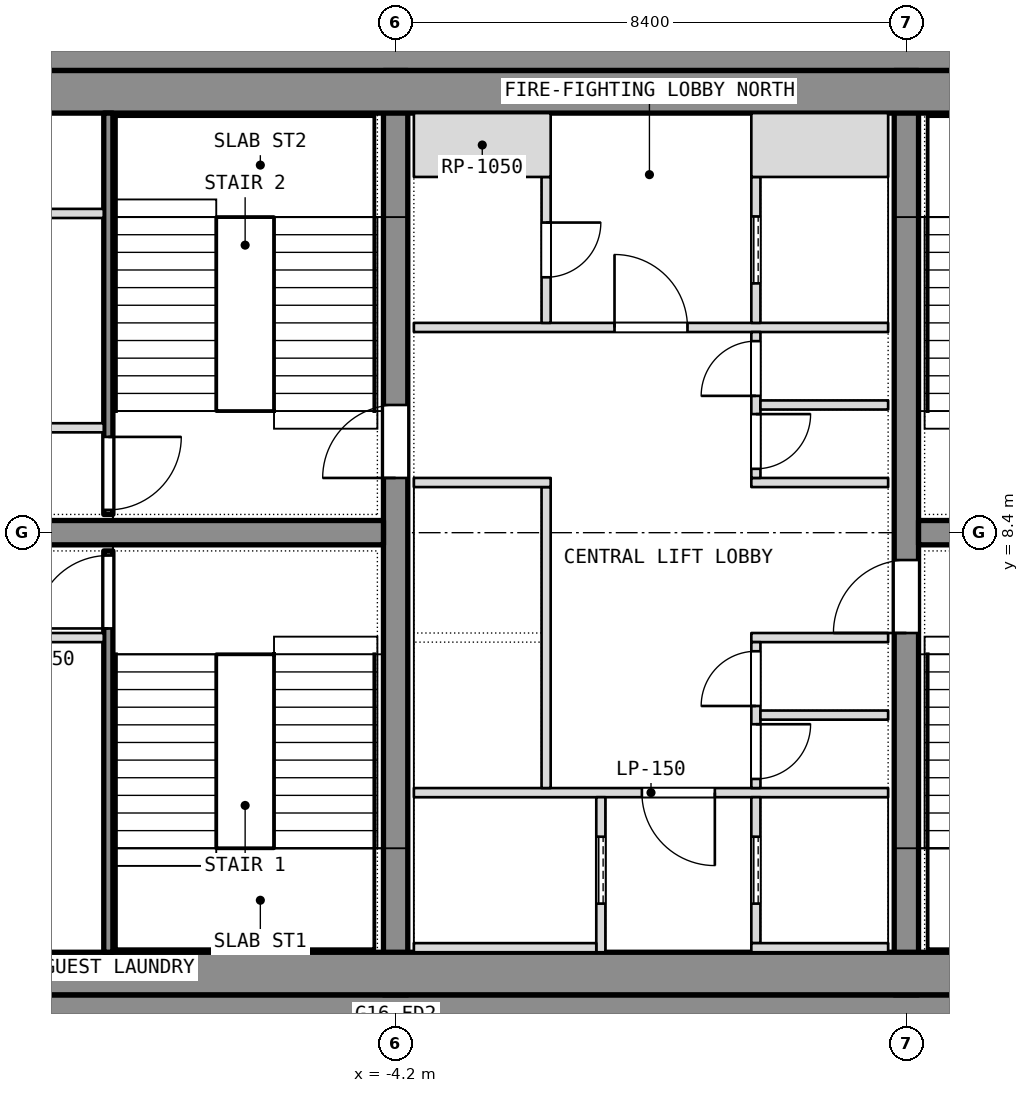
"""IFC4 building model, lengths in metres.
Left out: names, types, materials, properties, quantities, classifications, styles, units other than length and angle.
Written with IfcOpenShell. Run it as: python <this file> out.ifc"""

import sys

from ifc_helpers import new_model, si_unit, direction, frame, frame_2d, origin, place, context, subcontext, project, spatial, rectangle, extrude, element, fill, save


model = new_model("IFC4")
c1 = context("Model", 3, precision=1e-05, world=origin(), true_north=direction((0.0, 1.0)))
c2 = subcontext(c1, "Body", "Model", "MODEL_VIEW")
j1 = project(units=[si_unit("LENGTHUNIT", "METRE"), si_unit("PLANEANGLEUNIT", "RADIAN")], contexts=[c1])
p1 = place(None, origin())
s1 = spatial("IfcSite", under=j1, at=p1, CompositionType="ELEMENT")
p2 = place(p1, origin())
s2 = spatial("IfcBuilding", under=s1, at=p2, CompositionType="ELEMENT")
p3 = place(p2, frame((0.0, 0.0, 202.1)))
s3 = spatial("IfcBuildingStorey", under=s2, at=p3, CompositionType="ELEMENT", Elevation=202.1)
for number, where, z_axis, x_axis in (
    (1, (-11.1, 0.4, 0.0), (0.0, 0.0, 1.0), (1.0, 0.0, 0.0)),
    (2, (-11.1, 16.4, 0.0), (0.0, 0.0, 1.0), (1.0, 0.0, 0.0)),
):
    element("IfcWall", number, at=place(p3, frame(where, z_axis=z_axis, x_axis=x_axis)), inside=s3, PredefinedType="SHEAR", context=c2, shape_type="SweptSolid", body=[
        extrude(rectangle(XDim=22.2, YDim=0.8, at=frame_2d((11.1, 0.0))), origin(), (0.0, 0.0, 1.0), 3.6),
    ])
p4 = place(p3, frame((-4.2, 0.8, 0.0), z_axis=(0.0, 0.0, 1.0), x_axis=(0.0, 1.0, 0.0)))
e3 = element("IfcWall", 3, at=p4, inside=s3, PredefinedType="SHEAR", context=c2, shape_type="SweptSolid", body=[
    extrude(rectangle(XDim=15.2, YDim=0.4, at=frame_2d((7.6, 0.0))), origin(), (0.0, 0.0, 1.0), 3.6),
])
p5 = place(p4, frame((8.5, 0.0, 0.0)))
e4 = element("IfcOpeningElement", 4, at=p5, cuts=e3, PredefinedType="OPENING", context=c2, shape_type="SweptSolid", body=[
    extrude(rectangle(XDim=1.2, YDim=2.1, at=frame_2d((0.6, 1.05))), frame((0.0, 0.2, 0.0), z_axis=(0.0, -1.0, 0.0), x_axis=(1.0, 0.0, 0.0)), (0.0, 0.0, 1.0), 0.4),
])
p6 = place(p3, frame((4.2, 0.8, 0.0), z_axis=(0.0, 0.0, 1.0), x_axis=(0.0, 1.0, 0.0)))
e5 = element("IfcWall", 5, at=p6, inside=s3, PredefinedType="SHEAR", context=c2, shape_type="SweptSolid", body=[
    extrude(rectangle(XDim=15.2, YDim=0.4, at=frame_2d((7.6, 0.0))), origin(), (0.0, 0.0, 1.0), 3.6),
])
p7 = place(p6, frame((5.95, 0.0, 0.0)))
e6 = element("IfcOpeningElement", 6, at=p7, cuts=e5, PredefinedType="OPENING", context=c2, shape_type="SweptSolid", body=[
    extrude(rectangle(XDim=1.2, YDim=2.1, at=frame_2d((0.6, 1.05))), frame((0.0, 0.2, 0.0), z_axis=(0.0, -1.0, 0.0), x_axis=(1.0, 0.0, 0.0)), (0.0, 0.0, 1.0), 0.4),
])
for number, where, z_axis, x_axis in (
    (7, (-11.1, 8.4, 0.0), (0.0, 0.0, 1.0), (1.0, 0.0, 0.0)),
    (8, (4.4, 8.4, 0.0), (0.0, 0.0, 1.0), (1.0, 0.0, 0.0)),
):
    element("IfcWall", number, at=place(p3, frame(where, z_axis=z_axis, x_axis=x_axis)), inside=s3, PredefinedType="SHEAR", context=c2, shape_type="SweptSolid", body=[
        extrude(rectangle(XDim=6.7, YDim=0.4, at=frame_2d((3.35, 0.0))), origin(), (0.0, 0.0, 1.0), 3.6),
    ])
for number, where, z_axis, x_axis in (
    (9, (-11.1, 1.15, 0.0), (0.0, 0.0, 1.0), (1.0, 0.0, 0.0)),
    (10, (-11.1, 15.65, 0.0), (0.0, 0.0, 1.0), (1.0, 0.0, 0.0)),
):
    element("IfcWall", number, at=place(p3, frame(where, z_axis=z_axis, x_axis=x_axis)), inside=s3, PredefinedType="PARTITIONING", context=c2, shape_type="SweptSolid", body=[
        extrude(rectangle(XDim=22.2, YDim=0.7, at=frame_2d((11.1, 0.0))), origin(), (0.0, 0.0, 1.0), 3.34),
    ])
p8 = place(p3, frame((-8.925, 1.5, 0.0), z_axis=(0.0, 0.0, 1.0), x_axis=(0.0, 1.0, 0.0)))
e11 = element("IfcWall", 11, at=p8, inside=s3, PredefinedType="SHEAR", context=c2, shape_type="SweptSolid", body=[
    extrude(rectangle(XDim=6.6, YDim=0.15, at=frame_2d((3.3, 0.0))), origin(), (0.0, 0.0, 1.0), 3.34),
])
p9 = place(p8, frame((5.325, 0.0, 0.0)))
e12 = element("IfcOpeningElement", 12, at=p9, cuts=e11, PredefinedType="OPENING", context=c2, shape_type="SweptSolid", body=[
    extrude(rectangle(XDim=1.2, YDim=2.1, at=frame_2d((0.6, 1.05))), frame((0.0, 0.075, 0.0), z_axis=(0.0, -1.0, 0.0), x_axis=(1.0, 0.0, 0.0)), (0.0, 0.0, 1.0), 0.15),
])
p10 = place(p3, frame((-11.1, 6.675, 0.0), z_axis=(0.0, 0.0, 1.0), x_axis=(1.0, 0.0, 0.0)))
e13 = element("IfcWall", 13, at=p10, inside=s3, PredefinedType="PARTITIONING", context=c2, shape_type="SweptSolid", body=[
    extrude(rectangle(XDim=2.1, YDim=0.15, at=frame_2d((1.05, 0.0))), origin(), (0.0, 0.0, 1.0), 3.34),
])
p11 = place(p3, frame((-8.925, 8.7, 0.0), z_axis=(0.0, 0.0, 1.0), x_axis=(0.0, 1.0, 0.0)))
e14 = element("IfcWall", 14, at=p11, inside=s3, PredefinedType="SHEAR", context=c2, shape_type="SweptSolid", body=[
    extrude(rectangle(XDim=6.6, YDim=0.15, at=frame_2d((3.3, 0.0))), origin(), (0.0, 0.0, 1.0), 3.34),
])
p12 = place(p11, frame((0.075, 0.0, 0.0)))
e15 = element("IfcOpeningElement", 15, at=p12, cuts=e14, PredefinedType="OPENING", context=c2, shape_type="SweptSolid", body=[
    extrude(rectangle(XDim=1.2, YDim=2.1, at=frame_2d((0.6, 1.05))), frame((0.0, 0.075, 0.0), z_axis=(0.0, -1.0, 0.0), x_axis=(1.0, 0.0, 0.0)), (0.0, 0.0, 1.0), 0.15),
])
for number, where, z_axis, x_axis in (
    (16, (-11.1, 10.125, 0.0), (0.0, 0.0, 1.0), (1.0, 0.0, 0.0)),
    (17, (-11.1, 13.65, 0.0), (0.0, 0.0, 1.0), (1.0, 0.0, 0.0)),
):
    element("IfcWall", number, at=place(p3, frame(where, z_axis=z_axis, x_axis=x_axis)), inside=s3, PredefinedType="PARTITIONING", context=c2, shape_type="SweptSolid", body=[
        extrude(rectangle(XDim=2.1, YDim=0.15, at=frame_2d((1.05, 0.0))), origin(), (0.0, 0.0, 1.0), 3.34),
    ])
p13 = place(p3, frame((-3.9, 4.125, 0.0), z_axis=(0.0, 0.0, 1.0), x_axis=(1.0, 0.0, 0.0)))
e18 = element("IfcWall", 18, at=p13, inside=s3, PredefinedType="PARTITIONING", context=c2, shape_type="SweptSolid", body=[
    extrude(rectangle(XDim=7.8, YDim=0.15, at=frame_2d((3.9, 0.0))), origin(), (0.0, 0.0, 1.0), 3.34),
])
p14 = place(p13, frame((3.75, 0.0, 0.0)))
e19 = element("IfcOpeningElement", 19, at=p14, cuts=e18, PredefinedType="OPENING", context=c2, shape_type="SweptSolid", body=[
    extrude(rectangle(XDim=1.2, YDim=2.1, at=frame_2d((0.6, 1.05))), frame((0.0, 0.075, 0.0), z_axis=(0.0, -1.0, 0.0), x_axis=(1.0, 0.0, 0.0)), (0.0, 0.0, 1.0), 0.15),
])
p15 = place(p3, frame((-3.9, 11.775, 0.0), z_axis=(0.0, 0.0, 1.0), x_axis=(1.0, 0.0, 0.0)))
e20 = element("IfcWall", 20, at=p15, inside=s3, PredefinedType="PARTITIONING", context=c2, shape_type="SweptSolid", body=[
    extrude(rectangle(XDim=7.8, YDim=0.15, at=frame_2d((3.9, 0.0))), origin(), (0.0, 0.0, 1.0), 3.34),
])
p16 = place(p15, frame((3.3, 0.0, 0.0)))
e21 = element("IfcOpeningElement", 21, at=p16, cuts=e20, PredefinedType="OPENING", context=c2, shape_type="SweptSolid", body=[
    extrude(rectangle(XDim=1.2, YDim=2.1, at=frame_2d((0.6, 1.05))), frame((0.0, 0.075, 0.0), z_axis=(0.0, -1.0, 0.0), x_axis=(1.0, 0.0, 0.0)), (0.0, 0.0, 1.0), 0.15),
])
p17 = place(p3, frame((-0.825, 1.5, 0.0), z_axis=(0.0, 0.0, 1.0), x_axis=(0.0, 1.0, 0.0)))
e22 = element("IfcWall", 22, at=p17, inside=s3, PredefinedType="SHEAR", context=c2, shape_type="SweptSolid", body=[
    extrude(rectangle(XDim=2.55, YDim=0.15, at=frame_2d((1.275, 0.0))), origin(), (0.0, 0.0, 1.0), 3.6),
])
p18 = place(p17, frame((0.8, 0.0, 0.0)))
e23 = element("IfcOpeningElement", 23, at=p18, cuts=e22, PredefinedType="OPENING", context=c2, shape_type="SweptSolid", body=[
    extrude(rectangle(XDim=1.1, YDim=2.1, at=frame_2d((0.55, 1.05))), frame((0.0, 0.075, 0.0), z_axis=(0.0, -1.0, 0.0), x_axis=(1.0, 0.0, 0.0)), (0.0, 0.0, 1.0), 0.15),
])
p19 = place(p3, frame((-3.9, 1.575, 0.0), z_axis=(0.0, 0.0, 1.0), x_axis=(1.0, 0.0, 0.0)))
e24 = element("IfcWall", 24, at=p19, inside=s3, PredefinedType="SHEAR", context=c2, shape_type="SweptSolid", body=[
    extrude(rectangle(XDim=3.0, YDim=0.15, at=frame_2d((1.5, 0.0))), origin(), (0.0, 0.0, 1.0), 3.6),
])
p20 = place(p3, frame((-1.725, 4.2, 0.0), z_axis=(0.0, 0.0, 1.0), x_axis=(0.0, 1.0, 0.0)))
e25 = element("IfcWall", 25, at=p20, inside=s3, PredefinedType="SHEAR", context=c2, shape_type="SweptSolid", body=[
    extrude(rectangle(XDim=4.95, YDim=0.15, at=frame_2d((2.475, 0.0))), origin(), (0.0, 0.0, 1.0), 3.6),
])
p21 = place(p3, frame((-3.9, 9.225, 0.0), z_axis=(0.0, 0.0, 1.0), x_axis=(1.0, 0.0, 0.0)))
e26 = element("IfcWall", 26, at=p21, inside=s3, PredefinedType="SHEAR", context=c2, shape_type="SweptSolid", body=[
    extrude(rectangle(XDim=2.25, YDim=0.15, at=frame_2d((1.125, 0.0))), origin(), (0.0, 0.0, 1.0), 3.6),
])
p22 = place(p3, frame((-1.725, 11.85, 0.0), z_axis=(0.0, 0.0, 1.0), x_axis=(0.0, 1.0, 0.0)))
e27 = element("IfcWall", 27, at=p22, inside=s3, PredefinedType="PARTITIONING", context=c2, shape_type="SweptSolid", body=[
    extrude(rectangle(XDim=2.4, YDim=0.15, at=frame_2d((1.2, 0.0))), origin(), (0.0, 0.0, 1.0), 3.34),
])
p23 = place(p22, frame((0.75, 0.0, 0.0)))
e28 = element("IfcOpeningElement", 28, at=p23, cuts=e27, PredefinedType="OPENING", context=c2, shape_type="SweptSolid", body=[
    extrude(rectangle(XDim=0.9, YDim=2.1, at=frame_2d((0.45, 1.05))), frame((0.0, 0.075, 0.0), z_axis=(0.0, -1.0, 0.0), x_axis=(1.0, 0.0, 0.0)), (0.0, 0.0, 1.0), 0.15),
])
p24 = place(p3, frame((-3.9, 14.775, 0.0), z_axis=(0.0, 0.0, 1.0), x_axis=(1.0, 0.0, 0.0)))
e29 = element("IfcWall", 29, at=p24, inside=s3, PredefinedType="PARTITIONING", context=c2, shape_type="SweptSolid", body=[
    extrude(rectangle(XDim=2.25, YDim=1.05, at=frame_2d((1.125, 0.0))), origin(), (0.0, 0.0, 1.0), 3.34),
])
p25 = place(p3, frame((1.725, 1.65, 0.0), z_axis=(0.0, 0.0, 1.0), x_axis=(0.0, 1.0, 0.0)))
e30 = element("IfcWall", 30, at=p25, inside=s3, PredefinedType="SHEAR", context=c2, shape_type="SweptSolid", body=[
    extrude(rectangle(XDim=2.4, YDim=0.15, at=frame_2d((1.2, 0.0))), origin(), (0.0, 0.0, 1.0), 3.6),
])
p26 = place(p25, frame((0.65, 0.0, 0.0)))
e31 = element("IfcOpeningElement", 31, at=p26, cuts=e30, PredefinedType="OPENING", context=c2, shape_type="SweptSolid", body=[
    extrude(rectangle(XDim=1.1, YDim=2.1, at=frame_2d((0.55, 1.05))), frame((0.0, 0.075, 0.0), z_axis=(0.0, -1.0, 0.0), x_axis=(1.0, 0.0, 0.0)), (0.0, 0.0, 1.0), 0.15),
])
p27 = place(p3, frame((1.65, 1.575, 0.0), z_axis=(0.0, 0.0, 1.0), x_axis=(1.0, 0.0, 0.0)))
e32 = element("IfcWall", 32, at=p27, inside=s3, PredefinedType="SHEAR", context=c2, shape_type="SweptSolid", body=[
    extrude(rectangle(XDim=2.25, YDim=0.15, at=frame_2d((1.125, 0.0))), origin(), (0.0, 0.0, 1.0), 3.6),
])
p28 = place(p3, frame((1.725, 11.85, 0.0), z_axis=(0.0, 0.0, 1.0), x_axis=(0.0, 1.0, 0.0)))
e33 = element("IfcWall", 33, at=p28, inside=s3, PredefinedType="SHEAR", context=c2, shape_type="SweptSolid", body=[
    extrude(rectangle(XDim=2.4, YDim=0.15, at=frame_2d((1.2, 0.0))), origin(), (0.0, 0.0, 1.0), 3.6),
])
p29 = place(p28, frame((0.65, 0.0, 0.0)))
e34 = element("IfcOpeningElement", 34, at=p29, cuts=e33, PredefinedType="OPENING", context=c2, shape_type="SweptSolid", body=[
    extrude(rectangle(XDim=1.1, YDim=2.1, at=frame_2d((0.55, 1.05))), frame((0.0, 0.075, 0.0), z_axis=(0.0, -1.0, 0.0), x_axis=(1.0, 0.0, 0.0)), (0.0, 0.0, 1.0), 0.15),
])
p30 = place(p3, frame((1.65, 14.775, 0.0), z_axis=(0.0, 0.0, 1.0), x_axis=(1.0, 0.0, 0.0)))
e35 = element("IfcWall", 35, at=p30, inside=s3, PredefinedType="SHEAR", context=c2, shape_type="SweptSolid", body=[
    extrude(rectangle(XDim=2.25, YDim=1.05, at=frame_2d((1.125, 0.0))), origin(), (0.0, 0.0, 1.0), 3.6),
])
for number, where, z_axis, x_axis in (
    (36, (1.65, 6.675, 0.0), (0.0, 0.0, 1.0), (1.0, 0.0, 0.0)),
    (37, (1.65, 9.225, 0.0), (0.0, 0.0, 1.0), (1.0, 0.0, 0.0)),
):
    element("IfcWall", number, at=place(p3, frame(where, z_axis=z_axis, x_axis=x_axis)), inside=s3, PredefinedType="PARTITIONING", context=c2, shape_type="SweptSolid", body=[
        extrude(rectangle(XDim=2.25, YDim=0.15, at=frame_2d((1.125, 0.0))), origin(), (0.0, 0.0, 1.0), 3.34),
    ])
p31 = place(p3, frame((1.725, 4.2, 0.0), z_axis=(0.0, 0.0, 1.0), x_axis=(0.0, 1.0, 0.0)))
e38 = element("IfcWall", 38, at=p31, inside=s3, PredefinedType="PARTITIONING", context=c2, shape_type="SweptSolid", body=[
    extrude(rectangle(XDim=2.4, YDim=0.15, at=frame_2d((1.2, 0.0))), origin(), (0.0, 0.0, 1.0), 3.34),
])
p32 = place(p31, frame((0.15, 0.0, 0.0)))
e39 = element("IfcOpeningElement", 39, at=p32, cuts=e38, PredefinedType="OPENING", context=c2, shape_type="SweptSolid", body=[
    extrude(rectangle(XDim=0.9, YDim=2.1, at=frame_2d((0.45, 1.05))), frame((0.0, 0.075, 0.0), z_axis=(0.0, -1.0, 0.0), x_axis=(1.0, 0.0, 0.0)), (0.0, 0.0, 1.0), 0.15),
])
p33 = place(p31, frame((1.35, 0.0, 0.0)))
e40 = element("IfcOpeningElement", 40, at=p33, cuts=e38, PredefinedType="OPENING", context=c2, shape_type="SweptSolid", body=[
    extrude(rectangle(XDim=0.9, YDim=2.1, at=frame_2d((0.45, 1.05))), frame((0.0, 0.075, 0.0), z_axis=(0.0, -1.0, 0.0), x_axis=(1.0, 0.0, 0.0)), (0.0, 0.0, 1.0), 0.15),
])
p34 = place(p3, frame((1.725, 9.3, 0.0), z_axis=(0.0, 0.0, 1.0), x_axis=(0.0, 1.0, 0.0)))
e41 = element("IfcWall", 41, at=p34, inside=s3, PredefinedType="PARTITIONING", context=c2, shape_type="SweptSolid", body=[
    extrude(rectangle(XDim=2.4, YDim=0.15, at=frame_2d((1.2, 0.0))), origin(), (0.0, 0.0, 1.0), 3.34),
])
p35 = place(p34, frame((0.15, 0.0, 0.0)))
e42 = element("IfcOpeningElement", 42, at=p35, cuts=e41, PredefinedType="OPENING", context=c2, shape_type="SweptSolid", body=[
    extrude(rectangle(XDim=0.9, YDim=2.1, at=frame_2d((0.45, 1.05))), frame((0.0, 0.075, 0.0), z_axis=(0.0, -1.0, 0.0), x_axis=(1.0, 0.0, 0.0)), (0.0, 0.0, 1.0), 0.15),
])
p36 = place(p34, frame((1.35, 0.0, 0.0)))
e43 = element("IfcOpeningElement", 43, at=p36, cuts=e41, PredefinedType="OPENING", context=c2, shape_type="SweptSolid", body=[
    extrude(rectangle(XDim=0.9, YDim=2.1, at=frame_2d((0.45, 1.05))), frame((0.0, 0.075, 0.0), z_axis=(0.0, -1.0, 0.0), x_axis=(1.0, 0.0, 0.0)), (0.0, 0.0, 1.0), 0.15),
])
for number, where, z_axis, x_axis in (
    (44, (1.8, 5.4, 0.0), (0.0, 0.0, 1.0), (1.0, 0.0, 0.0)),
    (45, (1.8, 10.5, 0.0), (0.0, 0.0, 1.0), (1.0, 0.0, 0.0)),
):
    element("IfcWall", number, at=place(p3, frame(where, z_axis=z_axis, x_axis=x_axis)), inside=s3, PredefinedType="PARTITIONING", context=c2, shape_type="SweptSolid", body=[
        extrude(rectangle(XDim=2.1, YDim=0.15, at=frame_2d((1.05, 0.0))), origin(), (0.0, 0.0, 1.0), 3.34),
    ])
p37 = place(p9, origin())
e46 = element("IfcDoor", 46, at=p37, inside=s3, OperationType="SINGLE_SWING_LEFT", PredefinedType="DOOR", context=c2, shape_type="SweptSolid", body=[
    extrude(rectangle(XDim=1.2, YDim=2.1, at=frame_2d((0.6, 1.05))), frame((0.0, 0.025, 0.0), z_axis=(0.0, -1.0, 0.0), x_axis=(1.0, 0.0, 0.0)), (0.0, 0.0, 1.0), 0.05),
])
fill(e12, e46)
p38 = place(p12, origin())
e47 = element("IfcDoor", 47, at=p38, inside=s3, OperationType="SINGLE_SWING_LEFT", PredefinedType="DOOR", context=c2, shape_type="SweptSolid", body=[
    extrude(rectangle(XDim=1.2, YDim=2.1, at=frame_2d((0.6, 1.05))), frame((0.0, 0.025, 0.0), z_axis=(0.0, -1.0, 0.0), x_axis=(1.0, 0.0, 0.0)), (0.0, 0.0, 1.0), 0.05),
])
fill(e15, e47)
p39 = place(p32, origin())
e48 = element("IfcDoor", 48, at=p39, inside=s3, OperationType="SINGLE_SWING_LEFT", PredefinedType="DOOR", context=c2, shape_type="SweptSolid", body=[
    extrude(rectangle(XDim=0.9, YDim=2.1, at=frame_2d((0.45, 1.05))), frame((0.0, 0.025, 0.0), z_axis=(0.0, -1.0, 0.0), x_axis=(1.0, 0.0, 0.0)), (0.0, 0.0, 1.0), 0.05),
])
fill(e39, e48)
p40 = place(p33, origin())
e49 = element("IfcDoor", 49, at=p40, inside=s3, OperationType="SINGLE_SWING_LEFT", PredefinedType="DOOR", context=c2, shape_type="SweptSolid", body=[
    extrude(rectangle(XDim=0.9, YDim=2.1, at=frame_2d((0.45, 1.05))), frame((0.0, 0.025, 0.0), z_axis=(0.0, -1.0, 0.0), x_axis=(1.0, 0.0, 0.0)), (0.0, 0.0, 1.0), 0.05),
])
fill(e40, e49)
p41 = place(p35, origin())
e50 = element("IfcDoor", 50, at=p41, inside=s3, OperationType="SINGLE_SWING_LEFT", PredefinedType="DOOR", context=c2, shape_type="SweptSolid", body=[
    extrude(rectangle(XDim=0.9, YDim=2.1, at=frame_2d((0.45, 1.05))), frame((0.0, 0.025, 0.0), z_axis=(0.0, -1.0, 0.0), x_axis=(1.0, 0.0, 0.0)), (0.0, 0.0, 1.0), 0.05),
])
fill(e42, e50)
p42 = place(p36, origin())
e51 = element("IfcDoor", 51, at=p42, inside=s3, OperationType="SINGLE_SWING_LEFT", PredefinedType="DOOR", context=c2, shape_type="SweptSolid", body=[
    extrude(rectangle(XDim=0.9, YDim=2.1, at=frame_2d((0.45, 1.05))), frame((0.0, 0.025, 0.0), z_axis=(0.0, -1.0, 0.0), x_axis=(1.0, 0.0, 0.0)), (0.0, 0.0, 1.0), 0.05),
])
fill(e43, e51)
p43 = place(p18, origin())
e52 = element("IfcDoor", 52, at=p43, inside=s3, OperationType="SLIDING_TO_LEFT", PredefinedType="DOOR", context=c2, shape_type="SweptSolid", body=[
    extrude(rectangle(XDim=1.1, YDim=2.1, at=frame_2d((0.55, 1.05))), frame((0.0, 0.025, 0.0), z_axis=(0.0, -1.0, 0.0), x_axis=(1.0, 0.0, 0.0)), (0.0, 0.0, 1.0), 0.05),
])
fill(e23, e52)
p44 = place(p26, origin())
e53 = element("IfcDoor", 53, at=p44, inside=s3, OperationType="SLIDING_TO_LEFT", PredefinedType="DOOR", context=c2, shape_type="SweptSolid", body=[
    extrude(rectangle(XDim=1.1, YDim=2.1, at=frame_2d((0.55, 1.05))), frame((0.0, 0.025, 0.0), z_axis=(0.0, -1.0, 0.0), x_axis=(1.0, 0.0, 0.0)), (0.0, 0.0, 1.0), 0.05),
])
fill(e31, e53)
p45 = place(p29, origin())
e54 = element("IfcDoor", 54, at=p45, inside=s3, OperationType="SLIDING_TO_LEFT", PredefinedType="DOOR", context=c2, shape_type="SweptSolid", body=[
    extrude(rectangle(XDim=1.1, YDim=2.1, at=frame_2d((0.55, 1.05))), frame((0.0, 0.025, 0.0), z_axis=(0.0, -1.0, 0.0), x_axis=(1.0, 0.0, 0.0)), (0.0, 0.0, 1.0), 0.05),
])
fill(e34, e54)
p46 = place(p14, origin())
e55 = element("IfcDoor", 55, at=p46, inside=s3, OperationType="SINGLE_SWING_LEFT", PredefinedType="DOOR", context=c2, shape_type="SweptSolid", body=[
    extrude(rectangle(XDim=1.2, YDim=2.1, at=frame_2d((0.6, 1.05))), frame((0.0, 0.025, 0.0), z_axis=(0.0, -1.0, 0.0), x_axis=(1.0, 0.0, 0.0)), (0.0, 0.0, 1.0), 0.05),
])
fill(e19, e55)
p47 = place(p16, origin())
e56 = element("IfcDoor", 56, at=p47, inside=s3, OperationType="SINGLE_SWING_LEFT", PredefinedType="DOOR", context=c2, shape_type="SweptSolid", body=[
    extrude(rectangle(XDim=1.2, YDim=2.1, at=frame_2d((0.6, 1.05))), frame((0.0, 0.025, 0.0), z_axis=(0.0, -1.0, 0.0), x_axis=(1.0, 0.0, 0.0)), (0.0, 0.0, 1.0), 0.05),
])
fill(e21, e56)
p48 = place(p23, origin())
e57 = element("IfcDoor", 57, at=p48, inside=s3, OperationType="SINGLE_SWING_LEFT", PredefinedType="DOOR", context=c2, shape_type="SweptSolid", body=[
    extrude(rectangle(XDim=0.9, YDim=2.1, at=frame_2d((0.45, 1.05))), frame((0.0, 0.025, 0.0), z_axis=(0.0, -1.0, 0.0), x_axis=(1.0, 0.0, 0.0)), (0.0, 0.0, 1.0), 0.05),
])
fill(e28, e57)
p49 = place(p5, origin())
e58 = element("IfcDoor", 58, at=p49, inside=s3, OperationType="SINGLE_SWING_LEFT", PredefinedType="DOOR", context=c2, shape_type="SweptSolid", body=[
    extrude(rectangle(XDim=1.2, YDim=2.1, at=frame_2d((0.6, 1.05))), frame((0.0, 0.025, 0.0), z_axis=(0.0, -1.0, 0.0), x_axis=(1.0, 0.0, 0.0)), (0.0, 0.0, 1.0), 0.05),
])
fill(e4, e58)
p50 = place(p7, origin())
e59 = element("IfcDoor", 59, at=p50, inside=s3, OperationType="SINGLE_SWING_LEFT", PredefinedType="DOOR", context=c2, shape_type="SweptSolid", body=[
    extrude(rectangle(XDim=1.2, YDim=2.1, at=frame_2d((0.6, 1.05))), frame((0.0, 0.025, 0.0), z_axis=(0.0, -1.0, 0.0), x_axis=(1.0, 0.0, 0.0)), (0.0, 0.0, 1.0), 0.05),
])
fill(e6, e59)
save(model, sys.argv[1])
